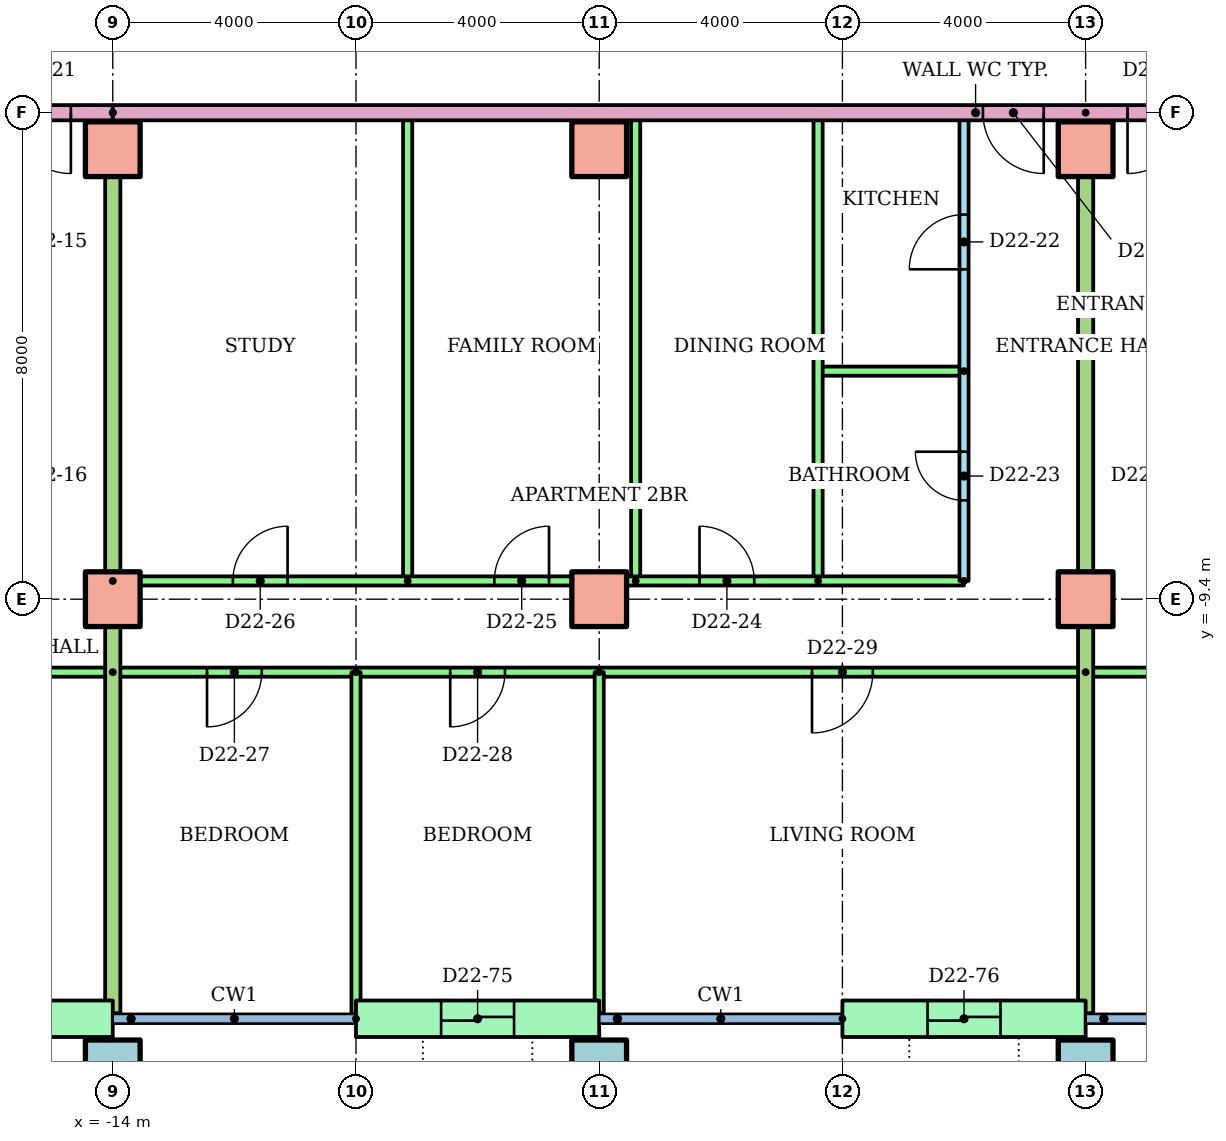
"""IFC4 building model, lengths in metres.
Left out: names, types, materials, properties, quantities, classifications, styles, units other than length and angle.
Written with IfcOpenShell. Run it as: python <this file> out.ifc"""

import sys

from ifc_helpers import new_model, si_unit, direction, frame, frame_2d, origin, origin_2d, place, context, subcontext, project, spatial, rectangle, hollow_rectangle, extrude, element, fill, save


model = new_model("IFC4")
c1 = context("Model", 3, precision=1e-05, world=origin(), true_north=direction((0.0, 1.0)))
c2 = subcontext(c1, "Body", "Model", "MODEL_VIEW")
j1 = project(units=[si_unit("LENGTHUNIT", "METRE"), si_unit("PLANEANGLEUNIT", "RADIAN")], contexts=[c1])
p1 = place(None, origin())
s1 = spatial("IfcSite", under=j1, at=p1, CompositionType="ELEMENT")
p2 = place(p1, origin())
s2 = spatial("IfcBuilding", under=s1, at=p2, CompositionType="ELEMENT")
p3 = place(p2, frame((0.0, 0.0, 87.1)))
s3 = spatial("IfcBuildingStorey", under=s2, at=p3, CompositionType="ELEMENT", Elevation=87.1)
for number, where in (
    (1, (-14.0, -17.1, 0.0)),
    (2, (-6.0, -17.1, 0.0)),
    (3, (2.0, -17.1, 0.0)),
):
    element("IfcColumn", number, at=place(p3, frame(where)), inside=s3, PredefinedType="COLUMN", context=c2, shape_type="SweptSolid", body=[
        extrude(hollow_rectangle(XDim=0.9, YDim=0.9, WallThickness=0.045, at=origin_2d()), origin(), (0.0, 0.0, 1.0), 3.2),
    ])
for number, where in (
    (4, (-14.0, -9.4, 0.0)),
    (5, (-6.0, -9.4, 0.0)),
    (6, (2.0, -9.4, 0.0)),
    (7, (-14.0, -2.0, 0.0)),
    (8, (-6.0, -2.0, 0.0)),
    (9, (2.0, -2.0, 0.0)),
):
    element("IfcColumn", number, at=place(p3, frame(where)), inside=s3, PredefinedType="COLUMN", context=c2, shape_type="SweptSolid", body=[
        extrude(rectangle(XDim=0.9, YDim=0.9, at=origin_2d()), origin(), (0.0, 0.0, 1.0), 3.2),
    ])
p4 = place(p3, frame((-18.0, -16.3, 0.0)))
e10 = element("IfcWall", 10, at=p4, inside=s3, PredefinedType="STANDARD", context=c2, shape_type="SweptSolid", body=[
    extrude(rectangle(XDim=4.0, YDim=0.6, at=frame_2d((2.0, 0.0))), origin(), (0.0, 0.0, 1.0), 2.92),
])
p5 = place(p4, frame((1.4, 0.0, 0.0)))
e11 = element("IfcOpeningElement", 11, at=p5, cuts=e10, PredefinedType="OPENING", context=c2, shape_type="SweptSolid", body=[
    extrude(rectangle(XDim=1.2, YDim=2.1, at=frame_2d((0.6, 1.05))), frame((0.0, 0.31, 0.0), z_axis=(0.0, -1.0, 0.0), x_axis=(1.0, 0.0, 0.0)), (0.0, 0.0, 1.0), 0.62),
])
p6 = place(p3, frame((-10.0, -16.3, 0.0)))
e12 = element("IfcWall", 12, at=p6, inside=s3, PredefinedType="STANDARD", context=c2, shape_type="SweptSolid", body=[
    extrude(rectangle(XDim=4.0, YDim=0.6, at=frame_2d((2.0, 0.0))), origin(), (0.0, 0.0, 1.0), 2.92),
])
p7 = place(p6, frame((1.4, 0.0, 0.0)))
e13 = element("IfcOpeningElement", 13, at=p7, cuts=e12, PredefinedType="OPENING", context=c2, shape_type="SweptSolid", body=[
    extrude(rectangle(XDim=1.2, YDim=2.1, at=frame_2d((0.6, 1.05))), frame((0.0, 0.31, 0.0), z_axis=(0.0, -1.0, 0.0), x_axis=(1.0, 0.0, 0.0)), (0.0, 0.0, 1.0), 0.62),
])
p8 = place(p3, frame((-2.0, -16.3, 0.0)))
e14 = element("IfcWall", 14, at=p8, inside=s3, PredefinedType="STANDARD", context=c2, shape_type="SweptSolid", body=[
    extrude(rectangle(XDim=4.0, YDim=0.6, at=frame_2d((2.0, 0.0))), origin(), (0.0, 0.0, 1.0), 2.92),
])
p9 = place(p8, frame((1.4, 0.0, 0.0)))
e15 = element("IfcOpeningElement", 15, at=p9, cuts=e14, PredefinedType="OPENING", context=c2, shape_type="SweptSolid", body=[
    extrude(rectangle(XDim=1.2, YDim=2.1, at=frame_2d((0.6, 1.05))), frame((0.0, 0.31, 0.0), z_axis=(0.0, -1.0, 0.0), x_axis=(1.0, 0.0, 0.0)), (0.0, 0.0, 1.0), 0.62),
])
p10 = place(p3, frame((-14.0, -10.6, 0.0), z_axis=(0.0, 0.0, 1.0), x_axis=(-1.0, 0.0, 0.0)))
e16 = element("IfcWall", 16, at=p10, inside=s3, PredefinedType="PARTITIONING", context=c2, shape_type="SweptSolid", body=[
    extrude(rectangle(XDim=14.62, YDim=0.15, at=frame_2d((7.31, 0.0))), origin(), (0.0, 0.0, 1.0), 2.4),
])
p11 = place(p10, frame((11.7, 0.0, 0.0)))
e17 = element("IfcOpeningElement", 17, at=p11, cuts=e16, PredefinedType="OPENING", context=c2, shape_type="SweptSolid", body=[
    extrude(rectangle(XDim=0.9, YDim=2.1, at=frame_2d((0.45, 1.05))), frame((0.0, 0.085, 0.0), z_axis=(0.0, -1.0, 0.0), x_axis=(1.0, 0.0, 0.0)), (0.0, 0.0, 1.0), 0.17),
])
p12 = place(p10, frame((4.45, 0.0, 0.0)))
e18 = element("IfcOpeningElement", 18, at=p12, cuts=e16, PredefinedType="OPENING", context=c2, shape_type="SweptSolid", body=[
    extrude(rectangle(XDim=1.0, YDim=2.1, at=frame_2d((0.5, 1.05))), frame((0.0, 0.085, 0.0), z_axis=(0.0, -1.0, 0.0), x_axis=(1.0, 0.0, 0.0)), (0.0, 0.0, 1.0), 0.17),
])
p13 = place(p3, frame((0.0, -9.1, 0.0), z_axis=(0.0, 0.0, 1.0), x_axis=(0.0, 1.0, 0.0)))
e19 = element("IfcWall", 19, at=p13, inside=s3, PredefinedType="PARTITIONING", context=c2, shape_type="SweptSolid", body=[
    extrude(rectangle(XDim=7.7, YDim=0.15, at=frame_2d((3.85, 0.0))), origin(), (0.0, 0.0, 1.0), 2.4),
])
p14 = place(p13, frame((5.125, 0.0, 0.0)))
e20 = element("IfcOpeningElement", 20, at=p14, cuts=e19, PredefinedType="OPENING", context=c2, shape_type="SweptSolid", body=[
    extrude(rectangle(XDim=0.9, YDim=2.1, at=frame_2d((0.45, 1.05))), frame((0.0, 0.085, 0.0), z_axis=(0.0, -1.0, 0.0), x_axis=(1.0, 0.0, 0.0)), (0.0, 0.0, 1.0), 0.17),
])
p15 = place(p13, frame((1.325, 0.0, 0.0)))
e21 = element("IfcOpeningElement", 21, at=p15, cuts=e19, PredefinedType="OPENING", context=c2, shape_type="SweptSolid", body=[
    extrude(rectangle(XDim=0.8, YDim=2.1, at=frame_2d((0.4, 1.05))), frame((0.0, 0.085, 0.0), z_axis=(0.0, -1.0, 0.0), x_axis=(1.0, 0.0, 0.0)), (0.0, 0.0, 1.0), 0.17),
])
p16 = place(p3, frame((0.0, -5.65, 0.0), z_axis=(0.0, 0.0, 1.0), x_axis=(-1.0, 0.0, 0.0)))
e22 = element("IfcWall", 22, at=p16, inside=s3, PredefinedType="PARTITIONING", context=c2, shape_type="SweptSolid", body=[
    extrude(rectangle(XDim=2.4, YDim=0.15, at=frame_2d((1.2, 0.0))), origin(), (0.0, 0.0, 1.0), 2.4),
])
for number, where, z_axis, x_axis in (
    (23, (-2.4, -9.1, 0.0), (0.0, 0.0, 1.0), (0.0, 1.0, 0.0)),
    (24, (-5.4, -9.1, 0.0), (0.0, 0.0, 1.0), (0.0, 1.0, 0.0)),
    (25, (-9.15, -9.1, 0.0), (0.0, 0.0, 1.0), (0.0, 1.0, 0.0)),
):
    element("IfcWall", number, at=place(p3, frame(where, z_axis=z_axis, x_axis=x_axis)), inside=s3, PredefinedType="PARTITIONING", context=c2, shape_type="SweptSolid", body=[
        extrude(rectangle(XDim=7.7, YDim=0.15, at=frame_2d((3.85, 0.0))), origin(), (0.0, 0.0, 1.0), 2.4),
    ])
p17 = place(p3, frame((-14.0, -9.1, 0.0)))
e26 = element("IfcWall", 26, at=p17, inside=s3, PredefinedType="PARTITIONING", context=c2, shape_type="SweptSolid", body=[
    extrude(rectangle(XDim=14.0, YDim=0.15, at=frame_2d((7.0, 0.0))), origin(), (0.0, 0.0, 1.0), 2.4),
])
p18 = place(p17, frame((9.65, 0.0, 0.0)))
e27 = element("IfcOpeningElement", 27, at=p18, cuts=e26, PredefinedType="OPENING", context=c2, shape_type="SweptSolid", body=[
    extrude(rectangle(XDim=0.9, YDim=2.1, at=frame_2d((0.45, 1.05))), frame((0.0, 0.085, 0.0), z_axis=(0.0, -1.0, 0.0), x_axis=(1.0, 0.0, 0.0)), (0.0, 0.0, 1.0), 0.17),
])
p19 = place(p17, frame((6.275, 0.0, 0.0)))
e28 = element("IfcOpeningElement", 28, at=p19, cuts=e26, PredefinedType="OPENING", context=c2, shape_type="SweptSolid", body=[
    extrude(rectangle(XDim=0.9, YDim=2.1, at=frame_2d((0.45, 1.05))), frame((0.0, 0.085, 0.0), z_axis=(0.0, -1.0, 0.0), x_axis=(1.0, 0.0, 0.0)), (0.0, 0.0, 1.0), 0.17),
])
p20 = place(p17, frame((1.975, 0.0, 0.0)))
e29 = element("IfcOpeningElement", 29, at=p20, cuts=e26, PredefinedType="OPENING", context=c2, shape_type="SweptSolid", body=[
    extrude(rectangle(XDim=0.9, YDim=2.1, at=frame_2d((0.45, 1.05))), frame((0.0, 0.085, 0.0), z_axis=(0.0, -1.0, 0.0), x_axis=(1.0, 0.0, 0.0)), (0.0, 0.0, 1.0), 0.17),
])
p21 = place(p3, frame((2.0, -10.6, 0.0), z_axis=(0.0, 0.0, 1.0), x_axis=(-1.0, 0.0, 0.0)))
e30 = element("IfcWall", 30, at=p21, inside=s3, PredefinedType="PARTITIONING", context=c2, shape_type="SweptSolid", body=[
    extrude(rectangle(XDim=16.0, YDim=0.15, at=frame_2d((8.0, 0.0))), origin(), (0.0, 0.0, 1.0), 2.4),
])
p22 = place(p21, frame((13.55, 0.0, 0.0)))
e31 = element("IfcOpeningElement", 31, at=p22, cuts=e30, PredefinedType="OPENING", context=c2, shape_type="SweptSolid", body=[
    extrude(rectangle(XDim=0.9, YDim=2.1, at=frame_2d((0.45, 1.05))), frame((0.0, 0.085, 0.0), z_axis=(0.0, -1.0, 0.0), x_axis=(1.0, 0.0, 0.0)), (0.0, 0.0, 1.0), 0.17),
])
p23 = place(p21, frame((9.55, 0.0, 0.0)))
e32 = element("IfcOpeningElement", 32, at=p23, cuts=e30, PredefinedType="OPENING", context=c2, shape_type="SweptSolid", body=[
    extrude(rectangle(XDim=0.9, YDim=2.1, at=frame_2d((0.45, 1.05))), frame((0.0, 0.085, 0.0), z_axis=(0.0, -1.0, 0.0), x_axis=(1.0, 0.0, 0.0)), (0.0, 0.0, 1.0), 0.17),
])
p24 = place(p21, frame((3.5, 0.0, 0.0)))
e33 = element("IfcOpeningElement", 33, at=p24, cuts=e30, PredefinedType="OPENING", context=c2, shape_type="SweptSolid", body=[
    extrude(rectangle(XDim=1.0, YDim=2.1, at=frame_2d((0.5, 1.05))), frame((0.0, 0.085, 0.0), z_axis=(0.0, -1.0, 0.0), x_axis=(1.0, 0.0, 0.0)), (0.0, 0.0, 1.0), 0.17),
])
p25 = place(p3, frame((-10.0, -10.6, 0.0), z_axis=(0.0, 0.0, 1.0), x_axis=(0.0, -1.0, 0.0)))
e34 = element("IfcWall", 34, at=p25, inside=s3, PredefinedType="PARTITIONING", context=c2, shape_type="SweptSolid", body=[
    extrude(rectangle(XDim=5.621, YDim=0.15, at=frame_2d((2.811, 0.0))), origin(), (0.0, 0.0, 1.0), 2.4),
])
p26 = place(p3, frame((-6.0, -10.6, 0.0), z_axis=(0.0, 0.0, 1.0), x_axis=(0.0, -1.0, 0.0)))
e35 = element("IfcWall", 35, at=p26, inside=s3, PredefinedType="PARTITIONING", context=c2, shape_type="SweptSolid", body=[
    extrude(rectangle(XDim=5.61, YDim=0.15, at=frame_2d((2.805, 0.0))), origin(), (0.0, 0.0, 1.0), 2.4),
])
p27 = place(p3, frame((-14.0, -1.4, 0.0), z_axis=(0.0, 0.0, 1.0), x_axis=(0.0, -1.0, 0.0)))
e36 = element("IfcWall", 36, at=p27, inside=s3, PredefinedType="PARTITIONING", context=c2, shape_type="SweptSolid", body=[
    extrude(rectangle(XDim=14.81, YDim=0.25, at=frame_2d((7.405, 0.0))), origin(), (0.0, 0.0, 1.0), 2.4),
])
p28 = place(p3, frame((18.0, -10.6, 0.0), z_axis=(0.0, 0.0, 1.0), x_axis=(-1.0, 0.0, 0.0)))
e37 = element("IfcWall", 37, at=p28, inside=s3, PredefinedType="PARTITIONING", context=c2, shape_type="SweptSolid", body=[
    extrude(rectangle(XDim=16.0, YDim=0.15, at=frame_2d((8.0, 0.0))), origin(), (0.0, 0.0, 1.0), 2.4),
])
p29 = place(p28, frame((11.5, 0.0, 0.0)))
e38 = element("IfcOpeningElement", 38, at=p29, cuts=e37, PredefinedType="OPENING", context=c2, shape_type="SweptSolid", body=[
    extrude(rectangle(XDim=1.0, YDim=2.1, at=frame_2d((0.5, 1.05))), frame((0.0, 0.085, 0.0), z_axis=(0.0, -1.0, 0.0), x_axis=(1.0, 0.0, 0.0)), (0.0, 0.0, 1.0), 0.17),
])
p30 = place(p28, frame((5.55, 0.0, 0.0)))
e39 = element("IfcOpeningElement", 39, at=p30, cuts=e37, PredefinedType="OPENING", context=c2, shape_type="SweptSolid", body=[
    extrude(rectangle(XDim=0.9, YDim=2.1, at=frame_2d((0.45, 1.05))), frame((0.0, 0.085, 0.0), z_axis=(0.0, -1.0, 0.0), x_axis=(1.0, 0.0, 0.0)), (0.0, 0.0, 1.0), 0.17),
])
p31 = place(p28, frame((1.55, 0.0, 0.0)))
e40 = element("IfcOpeningElement", 40, at=p31, cuts=e37, PredefinedType="OPENING", context=c2, shape_type="SweptSolid", body=[
    extrude(rectangle(XDim=0.9, YDim=2.1, at=frame_2d((0.45, 1.05))), frame((0.0, 0.085, 0.0), z_axis=(0.0, -1.0, 0.0), x_axis=(1.0, 0.0, 0.0)), (0.0, 0.0, 1.0), 0.17),
])
p32 = place(p3, frame((2.0, -1.4, 0.0), z_axis=(0.0, 0.0, 1.0), x_axis=(0.0, -1.0, 0.0)))
e41 = element("IfcWall", 41, at=p32, inside=s3, PredefinedType="PARTITIONING", context=c2, shape_type="SweptSolid", body=[
    extrude(rectangle(XDim=14.81, YDim=0.25, at=frame_2d((7.405, 0.0))), origin(), (0.0, 0.0, 1.0), 2.4),
])
p33 = place(p3, frame((-14.0, -1.4, 0.0), z_axis=(0.0, 0.0, 1.0), x_axis=(-1.0, 0.0, 0.0)))
e42 = element("IfcWall", 42, at=p33, inside=s3, PredefinedType="PARTITIONING", context=c2, shape_type="SweptSolid", body=[
    extrude(rectangle(XDim=14.62, YDim=0.25, at=frame_2d((7.31, 0.0))), origin(), (0.0, 0.0, 1.0), 2.4),
])
p34 = place(p33, frame((0.689, 0.0, 0.0)))
e43 = element("IfcOpeningElement", 43, at=p34, cuts=e42, PredefinedType="OPENING", context=c2, shape_type="SweptSolid", body=[
    extrude(rectangle(XDim=1.0, YDim=2.1, at=frame_2d((0.5, 1.05))), frame((0.0, 0.135, 0.0), z_axis=(0.0, -1.0, 0.0), x_axis=(1.0, 0.0, 0.0)), (0.0, 0.0, 1.0), 0.27),
])
p35 = place(p3, frame((14.0, -1.4, 0.0), z_axis=(0.0, 0.0, 1.0), x_axis=(-1.0, 0.0, 0.0)))
e44 = element("IfcWall", 44, at=p35, inside=s3, PredefinedType="PARTITIONING", context=c2, shape_type="SweptSolid", body=[
    extrude(rectangle(XDim=28.0, YDim=0.25, at=frame_2d((14.0, 0.0))), origin(), (0.0, 0.0, 1.0), 2.4),
])
p36 = place(p35, frame((12.689, 0.0, 0.0)))
e45 = element("IfcOpeningElement", 45, at=p36, cuts=e44, PredefinedType="OPENING", context=c2, shape_type="SweptSolid", body=[
    extrude(rectangle(XDim=1.0, YDim=2.1, at=frame_2d((0.5, 1.05))), frame((0.0, 0.135, 0.0), z_axis=(0.0, -1.0, 0.0), x_axis=(1.0, 0.0, 0.0)), (0.0, 0.0, 1.0), 0.27),
])
p37 = place(p35, frame((10.311, 0.0, 0.0)))
e46 = element("IfcOpeningElement", 46, at=p37, cuts=e44, PredefinedType="OPENING", context=c2, shape_type="SweptSolid", body=[
    extrude(rectangle(XDim=1.0, YDim=2.1, at=frame_2d((0.5, 1.05))), frame((0.0, 0.135, 0.0), z_axis=(0.0, -1.0, 0.0), x_axis=(1.0, 0.0, 0.0)), (0.0, 0.0, 1.0), 0.27),
])
p38 = place(p34, origin())
e47 = element("IfcDoor", 47, at=p38, inside=s3, OperationType="SINGLE_SWING_LEFT", PredefinedType="DOOR", context=c2, shape_type="SweptSolid", body=[
    extrude(rectangle(XDim=1.0, YDim=2.1, at=frame_2d((0.5, 1.05))), frame((0.0, 0.025, 0.0), z_axis=(0.0, -1.0, 0.0), x_axis=(1.0, 0.0, 0.0)), (0.0, 0.0, 1.0), 0.05),
])
fill(e43, e47)
p39 = place(p14, origin())
e48 = element("IfcDoor", 48, at=p39, inside=s3, OperationType="SINGLE_SWING_LEFT", PredefinedType="DOOR", context=c2, shape_type="SweptSolid", body=[
    extrude(rectangle(XDim=0.9, YDim=2.1, at=frame_2d((0.45, 1.05))), frame((0.0, 0.025, 0.0), z_axis=(0.0, -1.0, 0.0), x_axis=(1.0, 0.0, 0.0)), (0.0, 0.0, 1.0), 0.05),
])
fill(e20, e48)
p40 = place(p15, origin())
e49 = element("IfcDoor", 49, at=p40, inside=s3, OperationType="SINGLE_SWING_RIGHT", PredefinedType="DOOR", context=c2, shape_type="SweptSolid", body=[
    extrude(rectangle(XDim=0.8, YDim=2.1, at=frame_2d((0.4, 1.05))), frame((0.0, 0.025, 0.0), z_axis=(0.0, -1.0, 0.0), x_axis=(1.0, 0.0, 0.0)), (0.0, 0.0, 1.0), 0.05),
])
fill(e21, e49)
p41 = place(p18, origin())
e50 = element("IfcDoor", 50, at=p41, inside=s3, OperationType="SINGLE_SWING_LEFT", PredefinedType="DOOR", context=c2, shape_type="SweptSolid", body=[
    extrude(rectangle(XDim=0.9, YDim=2.1, at=frame_2d((0.45, 1.05))), frame((0.0, 0.025, 0.0), z_axis=(0.0, -1.0, 0.0), x_axis=(1.0, 0.0, 0.0)), (0.0, 0.0, 1.0), 0.05),
])
fill(e27, e50)
p42 = place(p19, origin())
e51 = element("IfcDoor", 51, at=p42, inside=s3, OperationType="SINGLE_SWING_RIGHT", PredefinedType="DOOR", context=c2, shape_type="SweptSolid", body=[
    extrude(rectangle(XDim=0.9, YDim=2.1, at=frame_2d((0.45, 1.05))), frame((0.0, 0.025, 0.0), z_axis=(0.0, -1.0, 0.0), x_axis=(1.0, 0.0, 0.0)), (0.0, 0.0, 1.0), 0.05),
])
fill(e28, e51)
p43 = place(p20, origin())
e52 = element("IfcDoor", 52, at=p43, inside=s3, OperationType="SINGLE_SWING_RIGHT", PredefinedType="DOOR", context=c2, shape_type="SweptSolid", body=[
    extrude(rectangle(XDim=0.9, YDim=2.1, at=frame_2d((0.45, 1.05))), frame((0.0, 0.025, 0.0), z_axis=(0.0, -1.0, 0.0), x_axis=(1.0, 0.0, 0.0)), (0.0, 0.0, 1.0), 0.05),
])
fill(e29, e52)
p44 = place(p22, origin())
e53 = element("IfcDoor", 53, at=p44, inside=s3, OperationType="SINGLE_SWING_RIGHT", PredefinedType="DOOR", context=c2, shape_type="SweptSolid", body=[
    extrude(rectangle(XDim=0.9, YDim=2.1, at=frame_2d((0.45, 1.05))), frame((0.0, 0.025, 0.0), z_axis=(0.0, -1.0, 0.0), x_axis=(1.0, 0.0, 0.0)), (0.0, 0.0, 1.0), 0.05),
])
fill(e31, e53)
p45 = place(p23, origin())
e54 = element("IfcDoor", 54, at=p45, inside=s3, OperationType="SINGLE_SWING_RIGHT", PredefinedType="DOOR", context=c2, shape_type="SweptSolid", body=[
    extrude(rectangle(XDim=0.9, YDim=2.1, at=frame_2d((0.45, 1.05))), frame((0.0, 0.025, 0.0), z_axis=(0.0, -1.0, 0.0), x_axis=(1.0, 0.0, 0.0)), (0.0, 0.0, 1.0), 0.05),
])
fill(e32, e54)
p46 = place(p24, origin())
e55 = element("IfcDoor", 55, at=p46, inside=s3, OperationType="SINGLE_SWING_RIGHT", PredefinedType="DOOR", context=c2, shape_type="SweptSolid", body=[
    extrude(rectangle(XDim=1.0, YDim=2.1, at=frame_2d((0.5, 1.05))), frame((0.0, 0.025, 0.0), z_axis=(0.0, -1.0, 0.0), x_axis=(1.0, 0.0, 0.0)), (0.0, 0.0, 1.0), 0.05),
])
fill(e33, e55)
p47 = place(p36, origin())
e56 = element("IfcDoor", 56, at=p47, inside=s3, OperationType="SINGLE_SWING_LEFT", PredefinedType="DOOR", context=c2, shape_type="SweptSolid", body=[
    extrude(rectangle(XDim=1.0, YDim=2.1, at=frame_2d((0.5, 1.05))), frame((0.0, 0.025, 0.0), z_axis=(0.0, -1.0, 0.0), x_axis=(1.0, 0.0, 0.0)), (0.0, 0.0, 1.0), 0.05),
])
fill(e45, e56)
p48 = place(p37, origin())
e57 = element("IfcDoor", 57, at=p48, inside=s3, OperationType="SINGLE_SWING_RIGHT", PredefinedType="DOOR", context=c2, shape_type="SweptSolid", body=[
    extrude(rectangle(XDim=1.0, YDim=2.1, at=frame_2d((0.5, 1.05))), frame((0.0, 0.025, 0.0), z_axis=(0.0, -1.0, 0.0), x_axis=(1.0, 0.0, 0.0)), (0.0, 0.0, 1.0), 0.05),
])
fill(e46, e57)
p49 = place(p7, origin())
e58 = element("IfcDoor", 58, at=p49, inside=s3, OperationType="SLIDING_TO_LEFT", PredefinedType="DOOR", context=c2, shape_type="SweptSolid", body=[
    extrude(rectangle(XDim=1.2, YDim=2.1, at=frame_2d((0.6, 1.05))), frame((0.0, 0.025, 0.0), z_axis=(0.0, -1.0, 0.0), x_axis=(1.0, 0.0, 0.0)), (0.0, 0.0, 1.0), 0.05),
])
fill(e13, e58)
p50 = place(p9, origin())
e59 = element("IfcDoor", 59, at=p50, inside=s3, OperationType="SLIDING_TO_LEFT", PredefinedType="DOOR", context=c2, shape_type="SweptSolid", body=[
    extrude(rectangle(XDim=1.2, YDim=2.1, at=frame_2d((0.6, 1.05))), frame((0.0, 0.025, 0.0), z_axis=(0.0, -1.0, 0.0), x_axis=(1.0, 0.0, 0.0)), (0.0, 0.0, 1.0), 0.05),
])
fill(e15, e59)
save(model, sys.argv[1])
